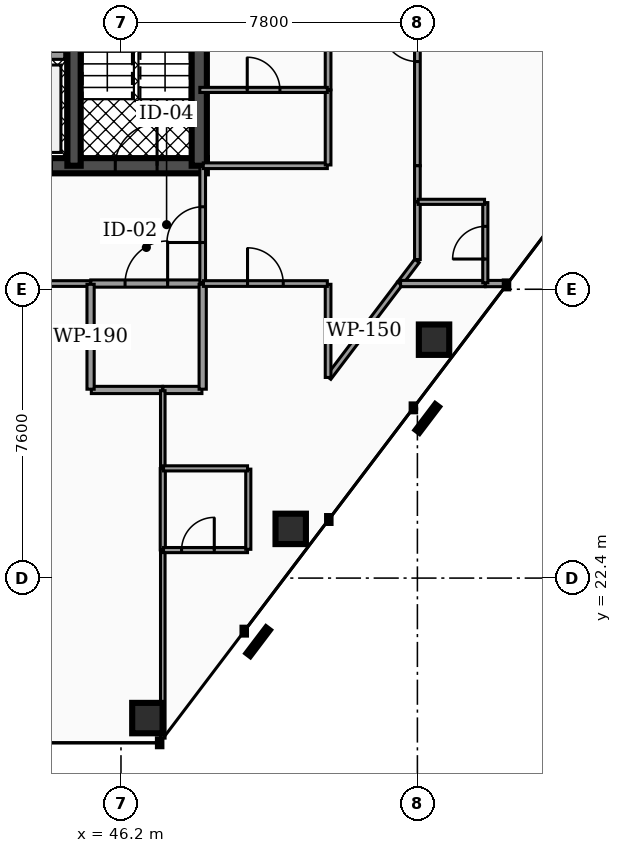
"""IFC4 building model, lengths in metres.
Left out: names, types, materials, properties, quantities, classifications, styles, units other than length and angle.
Written with IfcOpenShell. Run it as: python <this file> out.ifc"""

import sys

from ifc_helpers import new_model, si_unit, direction, frame, frame_2d, origin, origin_2d, place, context, subcontext, project, spatial, rectangle, hollow_rectangle, extrude, element, fill, save


model = new_model("IFC4")
c1 = context("Model", 3, precision=1e-05, world=origin(), true_north=direction((0.0, 1.0)))
c2 = subcontext(c1, "Body", "Model", "MODEL_VIEW")
j1 = project(units=[si_unit("LENGTHUNIT", "METRE"), si_unit("PLANEANGLEUNIT", "RADIAN")], contexts=[c1])
p1 = place(None, origin())
s1 = spatial("IfcSite", under=j1, at=p1, CompositionType="ELEMENT")
p2 = place(p1, origin())
s2 = spatial("IfcBuilding", under=s1, at=p2, CompositionType="ELEMENT")
p3 = place(p2, frame((0.0, 0.0, 130.9)))
s3 = spatial("IfcBuildingStorey", under=s2, at=p3, CompositionType="ELEMENT", Elevation=130.9)
p4 = place(p3, frame((28.4, 33.25, 0.0), z_axis=(0.0, 0.0, 1.0), x_axis=(1.0, 0.0, 0.0)))
e1 = element("IfcWall", 1, at=p4, inside=s3, PredefinedType="SHEAR", context=c2, shape_type="SweptSolid", body=[
    extrude(rectangle(XDim=20.06, YDim=0.4, at=frame_2d((10.03, 0.0))), origin(), (0.0, 0.0, 1.0), 3.5),
])
p5 = place(p4, frame((4.03, 0.0, 0.0)))
e2 = element("IfcOpeningElement", 2, at=p5, cuts=e1, PredefinedType="OPENING", context=c2, shape_type="SweptSolid", body=[
    extrude(rectangle(XDim=1.1, YDim=2.15, at=frame_2d((0.55, 1.075))), frame((0.0, 0.21, 0.0), z_axis=(0.0, -1.0, 0.0), x_axis=(1.0, 0.0, 0.0)), (0.0, 0.0, 1.0), 0.42),
])
p6 = place(p4, frame((14.87, 0.0, 0.0)))
e3 = element("IfcOpeningElement", 3, at=p6, cuts=e1, PredefinedType="OPENING", context=c2, shape_type="SweptSolid", body=[
    extrude(rectangle(XDim=1.1, YDim=2.15, at=frame_2d((0.55, 1.075))), frame((0.0, 0.21, 0.0), z_axis=(0.0, -1.0, 0.0), x_axis=(1.0, 0.0, 0.0)), (0.0, 0.0, 1.0), 0.42),
])
p7 = place(p4, frame((5.95, 0.0, 0.0)))
e4 = element("IfcOpeningElement", 4, at=p7, cuts=e1, PredefinedType="OPENING", context=c2, shape_type="SweptSolid", body=[
    extrude(rectangle(XDim=1.0, YDim=2.1, at=frame_2d((0.5, 1.05))), frame((0.0, 0.21, 0.0), z_axis=(0.0, -1.0, 0.0), x_axis=(1.0, 0.0, 0.0)), (0.0, 0.0, 1.0), 0.42),
])
p8 = place(p4, frame((7.65, 0.0, 0.0)))
e5 = element("IfcOpeningElement", 5, at=p8, cuts=e1, PredefinedType="OPENING", context=c2, shape_type="SweptSolid", body=[
    extrude(rectangle(XDim=1.0, YDim=2.1, at=frame_2d((0.5, 1.05))), frame((0.0, 0.21, 0.0), z_axis=(0.0, -1.0, 0.0), x_axis=(1.0, 0.0, 0.0)), (0.0, 0.0, 1.0), 0.42),
])
p9 = place(p4, frame((1.31, 0.0, 0.0)))
e6 = element("IfcOpeningElement", 6, at=p9, cuts=e1, PredefinedType="OPENING", context=c2, shape_type="SweptSolid", body=[
    extrude(rectangle(XDim=1.1, YDim=2.2, at=frame_2d((0.55, 1.1))), frame((0.0, 0.21, 0.0), z_axis=(0.0, -1.0, 0.0), x_axis=(1.0, 0.0, 0.0)), (0.0, 0.0, 1.0), 0.42),
])
p10 = place(p4, frame((9.44, 0.0, 0.0)))
e7 = element("IfcOpeningElement", 7, at=p10, cuts=e1, PredefinedType="OPENING", context=c2, shape_type="SweptSolid", body=[
    extrude(rectangle(XDim=1.12, YDim=2.05, at=frame_2d((0.56, 1.025))), frame((0.0, 0.21, 0.0), z_axis=(0.0, -1.0, 0.0), x_axis=(1.0, 0.0, 0.0)), (0.0, 0.0, 1.0), 0.42),
])
p11 = place(p4, frame((17.65, 0.0, 0.0)))
e8 = element("IfcOpeningElement", 8, at=p11, cuts=e1, PredefinedType="OPENING", context=c2, shape_type="SweptSolid", body=[
    extrude(rectangle(XDim=1.1, YDim=2.2, at=frame_2d((0.55, 1.1))), frame((0.0, 0.21, 0.0), z_axis=(0.0, -1.0, 0.0), x_axis=(1.0, 0.0, 0.0)), (0.0, 0.0, 1.0), 0.42),
])
p12 = place(p3, frame((44.965, 33.25, 0.0), z_axis=(0.0, 0.0, 1.0), x_axis=(0.0, 1.0, 0.0)))
e9 = element("IfcWall", 9, at=p12, inside=s3, PredefinedType="SHEAR", context=c2, shape_type="SweptSolid", body=[
    extrude(rectangle(XDim=10.2, YDim=0.35, at=frame_2d((5.1, 0.0))), origin(), (0.0, 0.0, 1.0), 3.5),
])
p13 = place(p3, frame((48.26, 33.25, 0.0), z_axis=(0.0, 0.0, 1.0), x_axis=(0.0, 1.0, 0.0)))
e10 = element("IfcWall", 10, at=p13, inside=s3, PredefinedType="SHEAR", context=c2, shape_type="SweptSolid", body=[
    extrude(rectangle(XDim=10.2, YDim=0.4, at=frame_2d((5.1, 0.0))), origin(), (0.0, 0.0, 1.0), 3.5),
])
p14 = place(p3, frame((46.895, 18.716, 0.0), z_axis=(-0.091289918014, -0.034294463497, 0.995233661329), x_axis=(0.351669482779, -0.936124230475, 0.0)))
e11 = element("IfcColumn", 11, at=p14, inside=s3, PredefinedType="COLUMN", context=c2, shape_type="SweptSolid", body=[
    extrude(hollow_rectangle(XDim=0.8, YDim=0.8, WallThickness=0.04, at=origin_2d()), origin(), (0.0, 0.0, 1.0), 3.517),
])
p15 = place(p3, frame((50.666, 23.695, 0.0), z_axis=(-0.063903576547, 0.002088352175, 0.997953892567), x_axis=(-0.032662302113, -0.99946644467, 0.0)))
e12 = element("IfcColumn", 12, at=p15, inside=s3, PredefinedType="COLUMN", context=c2, shape_type="SweptSolid", body=[
    extrude(hollow_rectangle(XDim=0.8, YDim=0.8, WallThickness=0.04, at=origin_2d()), origin(), (0.0, 0.0, 1.0), 3.507),
])
p16 = place(p3, frame((54.438, 28.673, 0.0), z_axis=(-0.036360710558, 0.038520063101, 0.998596066218), x_axis=(-0.727195467978, -0.686430441744, 0.0)))
e13 = element("IfcColumn", 13, at=p16, inside=s3, PredefinedType="COLUMN", context=c2, shape_type="SweptSolid", body=[
    extrude(hollow_rectangle(XDim=0.8, YDim=0.8, WallThickness=0.04, at=origin_2d()), origin(), (0.0, 0.0, 1.0), 3.505),
])
p17 = place(p3, frame((42.92, 36.155, 0.0), z_axis=(0.0, 0.0, 1.0), x_axis=(1.0, 0.0, 0.0)))
e14 = element("IfcWall", 14, at=p17, inside=s3, PredefinedType="SOLIDWALL", context=c2, shape_type="SweptSolid", body=[
    extrude(rectangle(XDim=1.8, YDim=0.21, at=frame_2d((0.9, 0.0))), origin(), (0.0, 0.0, 1.0), 2.472),
])
p18 = place(p3, frame((45.405, 30.15, 0.0), z_axis=(0.0, 0.0, 1.0), x_axis=(1.0, 0.0, 0.0)))
e15 = element("IfcWall", 15, at=p18, inside=s3, PredefinedType="PARTITIONING", context=c2, shape_type="SweptSolid", body=[
    extrude(rectangle(XDim=2.925, YDim=0.19, at=frame_2d((1.462, 0.0))), origin(), (0.0, 0.0, 1.0), 2.457),
])
p19 = place(p18, frame((0.903, 0.0, 0.0)))
e16 = element("IfcOpeningElement", 16, at=p19, cuts=e15, PredefinedType="OPENING", context=c2, shape_type="SweptSolid", body=[
    extrude(rectangle(XDim=1.12, YDim=2.05, at=frame_2d((0.56, 1.025))), frame((0.0, 0.105, 0.0), z_axis=(0.0, -1.0, 0.0), x_axis=(1.0, 0.0, 0.0)), (0.0, 0.0, 1.0), 0.21),
])
p20 = place(p3, frame((48.35, 30.17, 0.0), z_axis=(0.0, 0.0, 1.0), x_axis=(0.0, 1.0, 0.0)))
e17 = element("IfcWall", 17, at=p20, inside=s3, PredefinedType="PARTITIONING", context=c2, shape_type="SweptSolid", body=[
    extrude(rectangle(XDim=3.06, YDim=0.15, at=frame_2d((1.53, 0.0))), origin(), (0.0, 0.0, 1.0), 2.457),
])
p21 = place(p20, frame((1.06, 0.0, 0.0)))
e18 = element("IfcOpeningElement", 18, at=p21, cuts=e17, PredefinedType="OPENING", context=c2, shape_type="SweptSolid", body=[
    extrude(rectangle(XDim=0.94, YDim=2.05, at=frame_2d((0.47, 1.025))), frame((0.0, 0.085, 0.0), z_axis=(0.0, -1.0, 0.0), x_axis=(1.0, 0.0, 0.0)), (0.0, 0.0, 1.0), 0.17),
])
p22 = place(p3, frame((35.385, 30.15, 0.0), z_axis=(0.0, 0.0, 1.0), x_axis=(1.0, 0.0, 0.0)))
e19 = element("IfcWall", 19, at=p22, inside=s3, PredefinedType="PARTITIONING", context=c2, shape_type="SweptSolid", body=[
    extrude(rectangle(XDim=10.01, YDim=0.15, at=frame_2d((5.005, 0.0))), origin(), (0.0, 0.0, 1.0), 2.457),
])
p23 = place(p22, frame((7.935, 0.0, 0.0)))
e20 = element("IfcOpeningElement", 20, at=p23, cuts=e19, PredefinedType="OPENING", context=c2, shape_type="SweptSolid", body=[
    extrude(rectangle(XDim=0.94, YDim=2.05, at=frame_2d((0.47, 1.025))), frame((0.0, 0.085, 0.0), z_axis=(0.0, -1.0, 0.0), x_axis=(1.0, 0.0, 0.0)), (0.0, 0.0, 1.0), 0.17),
])
p24 = place(p3, frame((45.42, 27.35, 0.0), z_axis=(0.0, 0.0, 1.0), x_axis=(1.0, 0.0, 0.0)))
e21 = element("IfcWall", 21, at=p24, inside=s3, PredefinedType="PARTITIONING", context=c2, shape_type="SweptSolid", body=[
    extrude(rectangle(XDim=1.875, YDim=0.19, at=frame_2d((0.938, 0.0))), origin(), (0.0, 0.0, 1.0), 2.457),
])
p25 = place(p3, frame((45.4, 27.37, 0.0), z_axis=(0.0, 0.0, 1.0), x_axis=(0.0, 1.0, 0.0)))
e22 = element("IfcWall", 22, at=p25, inside=s3, PredefinedType="PARTITIONING", context=c2, shape_type="SweptSolid", body=[
    extrude(rectangle(XDim=2.76, YDim=0.19, at=frame_2d((1.38, 0.0))), origin(), (0.0, 0.0, 1.0), 2.457),
])
p26 = place(p3, frame((47.305, 27.35, 0.0), z_axis=(0.0, 0.0, 1.0), x_axis=(1.0, 0.0, 0.0)))
e23 = element("IfcWall", 23, at=p26, inside=s3, PredefinedType="PARTITIONING", context=c2, shape_type="SweptSolid", body=[
    extrude(rectangle(XDim=1.025, YDim=0.19, at=frame_2d((0.513, 0.0))), origin(), (0.0, 0.0, 1.0), 2.457),
])
p27 = place(p3, frame((48.35, 27.37, 0.0), z_axis=(0.0, 0.0, 1.0), x_axis=(0.0, 1.0, 0.0)))
e24 = element("IfcWall", 24, at=p27, inside=s3, PredefinedType="PARTITIONING", context=c2, shape_type="SweptSolid", body=[
    extrude(rectangle(XDim=2.76, YDim=0.19, at=frame_2d((1.38, 0.0))), origin(), (0.0, 0.0, 1.0), 2.457),
])
p28 = place(p3, frame((51.662, 27.675, 0.0), z_axis=(0.0, 0.0, 1.0), x_axis=(0.603831940294, 0.797111653334, 0.0)))
e25 = element("IfcWall", 25, at=p28, inside=s3, PredefinedType="PARTITIONING", context=c2, shape_type="SweptSolid", body=[
    extrude(rectangle(XDim=3.104, YDim=0.15, at=frame_2d((1.552, 0.0))), origin(), (0.0, 0.0, 1.0), 2.457),
])
p29 = place(p3, frame((51.65, 27.679, 0.0), z_axis=(0.0, 0.0, 1.0), x_axis=(0.0, 1.0, 0.0)))
e26 = element("IfcWall", 26, at=p29, inside=s3, PredefinedType="PARTITIONING", context=c2, shape_type="SweptSolid", body=[
    extrude(rectangle(XDim=2.451, YDim=0.15, at=frame_2d((1.225, 0.0))), origin(), (0.0, 0.0, 1.0), 2.457),
])
p30 = place(p3, frame((48.37, 30.15, 0.0), z_axis=(0.0, 0.0, 1.0), x_axis=(1.0, 0.0, 0.0)))
e27 = element("IfcWall", 27, at=p30, inside=s3, PredefinedType="PARTITIONING", context=c2, shape_type="SweptSolid", body=[
    extrude(rectangle(XDim=3.26, YDim=0.15, at=frame_2d((1.63, 0.0))), origin(), (0.0, 0.0, 1.0), 2.457),
])
p31 = place(p30, frame((1.16, 0.0, 0.0)))
e28 = element("IfcOpeningElement", 28, at=p31, cuts=e27, PredefinedType="OPENING", context=c2, shape_type="SweptSolid", body=[
    extrude(rectangle(XDim=0.94, YDim=2.05, at=frame_2d((0.47, 1.025))), frame((0.0, 0.085, 0.0), z_axis=(0.0, -1.0, 0.0), x_axis=(1.0, 0.0, 0.0)), (0.0, 0.0, 1.0), 0.17),
])
p32 = place(p3, frame((54.0, 33.25, 0.0), z_axis=(0.0, 0.0, 1.0), x_axis=(0.0, 1.0, 0.0)))
e29 = element("IfcWall", 29, at=p32, inside=s3, PredefinedType="PARTITIONING", context=c2, shape_type="SweptSolid", body=[
    extrude(rectangle(XDim=6.423, YDim=0.15, at=frame_2d((3.212, 0.0))), origin(), (0.0, 0.0, 1.0), 2.457),
])
p33 = place(p32, frame((2.742, 0.0, 0.0)))
e30 = element("IfcOpeningElement", 30, at=p33, cuts=e29, PredefinedType="OPENING", context=c2, shape_type="SweptSolid", body=[
    extrude(rectangle(XDim=0.94, YDim=2.05, at=frame_2d((0.47, 1.025))), frame((0.0, 0.085, 0.0), z_axis=(0.0, -1.0, 0.0), x_axis=(1.0, 0.0, 0.0)), (0.0, 0.0, 1.0), 0.17),
])
p34 = place(p3, frame((54.0, 32.305, 0.0), z_axis=(0.0, 0.0, 1.0), x_axis=(0.0, 1.0, 0.0)))
e31 = element("IfcWall", 31, at=p34, inside=s3, PredefinedType="PARTITIONING", context=c2, shape_type="SweptSolid", body=[
    extrude(rectangle(XDim=0.945, YDim=0.15, at=frame_2d((0.473, 0.0))), origin(), (0.0, 0.0, 1.0), 2.457),
])
p35 = place(p3, frame((54.0, 30.781, 0.0), z_axis=(0.0, 0.0, 1.0), x_axis=(0.0, 1.0, 0.0)))
e32 = element("IfcWall", 32, at=p35, inside=s3, PredefinedType="PARTITIONING", context=c2, shape_type="SweptSolid", body=[
    extrude(rectangle(XDim=1.514, YDim=0.15, at=frame_2d((0.757, 0.0))), origin(), (0.0, 0.0, 1.0), 2.457),
])
p36 = place(p3, frame((53.54, 30.154, 0.0), z_axis=(0.0, 0.0, 1.0), x_axis=(0.603680225987, 0.797226557982, 0.0)))
e33 = element("IfcWall", 33, at=p36, inside=s3, PredefinedType="PARTITIONING", context=c2, shape_type="SweptSolid", body=[
    extrude(rectangle(XDim=0.742, YDim=0.15, at=frame_2d((0.371, 0.0))), origin(), (0.0, 0.0, 1.0), 2.457),
])
p37 = place(p3, frame((51.65, 35.25, 0.0), z_axis=(0.0, 0.0, 1.0), x_axis=(0.0, 1.0, 0.0)))
e34 = element("IfcWall", 34, at=p37, inside=s3, PredefinedType="PARTITIONING", context=c2, shape_type="SweptSolid", body=[
    extrude(rectangle(XDim=5.994, YDim=0.15, at=frame_2d((2.997, 0.0))), origin(), (0.0, 0.0, 1.0), 2.457),
])
p38 = place(p37, frame((2.527, 0.0, 0.0)))
e35 = element("IfcOpeningElement", 35, at=p38, cuts=e34, PredefinedType="OPENING", context=c2, shape_type="SweptSolid", body=[
    extrude(rectangle(XDim=0.94, YDim=2.05, at=frame_2d((0.47, 1.025))), frame((0.0, 0.085, 0.0), z_axis=(0.0, -1.0, 0.0), x_axis=(1.0, 0.0, 0.0)), (0.0, 0.0, 1.0), 0.17),
])
p39 = place(p3, frame((48.365, 33.25, 0.0), z_axis=(0.0, 0.0, 1.0), x_axis=(1.0, 0.0, 0.0)))
e36 = element("IfcWall", 36, at=p39, inside=s3, PredefinedType="PARTITIONING", context=c2, shape_type="SweptSolid", body=[
    extrude(rectangle(XDim=3.265, YDim=0.15, at=frame_2d((1.632, 0.0))), origin(), (0.0, 0.0, 1.0), 2.457),
])
p40 = place(p3, frame((51.65, 33.27, 0.0), z_axis=(0.0, 0.0, 1.0), x_axis=(0.0, 1.0, 0.0)))
e37 = element("IfcWall", 37, at=p40, inside=s3, PredefinedType="PARTITIONING", context=c2, shape_type="SweptSolid", body=[
    extrude(rectangle(XDim=1.969, YDim=0.15, at=frame_2d((0.985, 0.0))), origin(), (0.0, 0.0, 1.0), 2.457),
])
p41 = place(p3, frame((47.3, 25.292, 0.0), z_axis=(0.0, 0.0, 1.0), x_axis=(0.0, 1.0, 0.0)))
e38 = element("IfcWall", 38, at=p41, inside=s3, PredefinedType="PARTITIONING", context=c2, shape_type="SweptSolid", body=[
    extrude(rectangle(XDim=2.038, YDim=0.12, at=frame_2d((1.019, 0.0))), origin(), (0.0, 0.0, 1.0), 2.457),
])
p42 = place(p3, frame((47.3, 18.19, 0.0), z_axis=(0.0, 0.0, 1.0), x_axis=(0.0, 1.0, 0.0)))
e39 = element("IfcWall", 39, at=p42, inside=s3, PredefinedType="PARTITIONING", context=c2, shape_type="SweptSolid", body=[
    extrude(rectangle(XDim=4.942, YDim=0.12, at=frame_2d((2.471, 0.0))), origin(), (0.0, 0.0, 1.0), 2.457),
])
p43 = place(p3, frame((47.3, 23.142, 0.0), z_axis=(0.0, 0.0, 1.0), x_axis=(0.0, 1.0, 0.0)))
e40 = element("IfcWall", 40, at=p43, inside=s3, PredefinedType="PARTITIONING", context=c2, shape_type="SweptSolid", body=[
    extrude(rectangle(XDim=2.14, YDim=0.135, at=frame_2d((1.07, 0.0))), origin(), (0.0, 0.0, 1.0), 2.457),
])
p44 = place(p3, frame((47.32, 23.137, 0.0), z_axis=(0.0, 0.0, 1.0), x_axis=(1.0, 0.0, 0.0)))
e41 = element("IfcWall", 41, at=p44, inside=s3, PredefinedType="PARTITIONING", context=c2, shape_type="SweptSolid", body=[
    extrude(rectangle(XDim=2.21, YDim=0.135, at=frame_2d((1.105, 0.0))), origin(), (0.0, 0.0, 1.0), 2.457),
])
p45 = place(p44, frame((0.475, 0.0, 0.0)))
e42 = element("IfcOpeningElement", 42, at=p45, cuts=e41, PredefinedType="OPENING", context=c2, shape_type="SweptSolid", body=[
    extrude(rectangle(XDim=0.86, YDim=2.05, at=frame_2d((0.43, 1.025))), frame((0.0, 0.077, 0.0), z_axis=(0.0, -1.0, 0.0), x_axis=(1.0, 0.0, 0.0)), (0.0, 0.0, 1.0), 0.155),
])
p46 = place(p3, frame((49.55, 23.157, 0.0), z_axis=(0.0, 0.0, 1.0), x_axis=(0.0, 1.0, 0.0)))
e43 = element("IfcWall", 43, at=p46, inside=s3, PredefinedType="PARTITIONING", context=c2, shape_type="SweptSolid", body=[
    extrude(rectangle(XDim=2.11, YDim=0.135, at=frame_2d((1.055, 0.0))), origin(), (0.0, 0.0, 1.0), 2.457),
])
p47 = place(p3, frame((47.32, 25.287, 0.0), z_axis=(0.0, 0.0, 1.0), x_axis=(1.0, 0.0, 0.0)))
e44 = element("IfcWall", 44, at=p47, inside=s3, PredefinedType="PARTITIONING", context=c2, shape_type="SweptSolid", body=[
    extrude(rectangle(XDim=2.21, YDim=0.135, at=frame_2d((1.105, 0.0))), origin(), (0.0, 0.0, 1.0), 2.457),
])
p48 = place(p3, frame((55.792, 30.15, 0.0), z_axis=(0.0, 0.0, 1.0), x_axis=(1.0, 0.0, 0.0)))
e45 = element("IfcWall", 45, at=p48, inside=s3, PredefinedType="PARTITIONING", context=c2, shape_type="SweptSolid", body=[
    extrude(rectangle(XDim=0.565, YDim=0.165, at=frame_2d((0.283, 0.0))), origin(), (0.0, 0.0, 1.0), 2.457),
])
p49 = place(p3, frame((53.557, 30.15, 0.0), z_axis=(0.0, 0.0, 1.0), x_axis=(1.0, 0.0, 0.0)))
e46 = element("IfcWall", 46, at=p49, inside=s3, PredefinedType="PARTITIONING", context=c2, shape_type="SweptSolid", body=[
    extrude(rectangle(XDim=2.225, YDim=0.165, at=frame_2d((1.113, 0.0))), origin(), (0.0, 0.0, 1.0), 2.457),
])
p50 = place(p3, frame((55.787, 30.17, 0.0), z_axis=(0.0, 0.0, 1.0), x_axis=(0.0, 1.0, 0.0)))
e47 = element("IfcWall", 47, at=p50, inside=s3, PredefinedType="PARTITIONING", context=c2, shape_type="SweptSolid", body=[
    extrude(rectangle(XDim=2.11, YDim=0.135, at=frame_2d((1.055, 0.0))), origin(), (0.0, 0.0, 1.0), 2.457),
])
p51 = place(p50, frame((0.625, 0.0, 0.0)))
e48 = element("IfcOpeningElement", 48, at=p51, cuts=e47, PredefinedType="OPENING", context=c2, shape_type="SweptSolid", body=[
    extrude(rectangle(XDim=0.86, YDim=2.05, at=frame_2d((0.43, 1.025))), frame((0.0, 0.077, 0.0), z_axis=(0.0, -1.0, 0.0), x_axis=(1.0, 0.0, 0.0)), (0.0, 0.0, 1.0), 0.155),
])
p52 = place(p3, frame((54.02, 32.3, 0.0), z_axis=(0.0, 0.0, 1.0), x_axis=(1.0, 0.0, 0.0)))
e49 = element("IfcWall", 49, at=p52, inside=s3, PredefinedType="PARTITIONING", context=c2, shape_type="SweptSolid", body=[
    extrude(rectangle(XDim=1.747, YDim=0.135, at=frame_2d((0.874, 0.0))), origin(), (0.0, 0.0, 1.0), 2.457),
])
p53 = place(p3, frame((48.275, 35.245, 0.0), z_axis=(0.0, 0.0, 1.0), x_axis=(1.0, 0.0, 0.0)))
e50 = element("IfcWall", 50, at=p53, inside=s3, PredefinedType="PARTITIONING", context=c2, shape_type="SweptSolid", body=[
    extrude(rectangle(XDim=3.355, YDim=0.135, at=frame_2d((1.677, 0.0))), origin(), (0.0, 0.0, 1.0), 2.457),
])
p54 = place(p53, frame((1.248, 0.0, 0.0)))
e51 = element("IfcOpeningElement", 51, at=p54, cuts=e50, PredefinedType="OPENING", context=c2, shape_type="SweptSolid", body=[
    extrude(rectangle(XDim=0.86, YDim=2.05, at=frame_2d((0.43, 1.025))), frame((0.0, 0.077, 0.0), z_axis=(0.0, -1.0, 0.0), x_axis=(1.0, 0.0, 0.0)), (0.0, 0.0, 1.0), 0.155),
])
p55 = place(p11, origin())
e52 = element("IfcDoor", 52, at=p55, inside=s3, OperationType="SINGLE_SWING_RIGHT", PredefinedType="DOOR", context=c2, shape_type="SweptSolid", body=[
    extrude(rectangle(XDim=1.1, YDim=2.2, at=frame_2d((0.55, 1.1))), frame((0.0, 0.025, 0.0), z_axis=(0.0, -1.0, 0.0), x_axis=(1.0, 0.0, 0.0)), (0.0, 0.0, 1.0), 0.05),
])
fill(e8, e52)
p56 = place(p19, origin())
e53 = element("IfcDoor", 53, at=p56, inside=s3, OperationType="SINGLE_SWING_RIGHT", PredefinedType="DOOR", context=c2, shape_type="SweptSolid", body=[
    extrude(rectangle(XDim=1.12, YDim=2.05, at=frame_2d((0.56, 1.025))), frame((0.0, 0.025, 0.0), z_axis=(0.0, -1.0, 0.0), x_axis=(1.0, 0.0, 0.0)), (0.0, 0.0, 1.0), 0.05),
])
fill(e16, e53)
p57 = place(p21, origin())
e54 = element("IfcDoor", 54, at=p57, inside=s3, OperationType="SINGLE_SWING_LEFT", PredefinedType="DOOR", context=c2, shape_type="SweptSolid", body=[
    extrude(rectangle(XDim=0.94, YDim=2.05, at=frame_2d((0.47, 1.025))), frame((0.0, 0.025, 0.0), z_axis=(0.0, -1.0, 0.0), x_axis=(1.0, 0.0, 0.0)), (0.0, 0.0, 1.0), 0.05),
])
fill(e18, e54)
p58 = place(p31, origin())
e55 = element("IfcDoor", 55, at=p58, inside=s3, OperationType="SINGLE_SWING_LEFT", PredefinedType="DOOR", context=c2, shape_type="SweptSolid", body=[
    extrude(rectangle(XDim=0.94, YDim=2.05, at=frame_2d((0.47, 1.025))), frame((0.0, 0.025, 0.0), z_axis=(0.0, -1.0, 0.0), x_axis=(1.0, 0.0, 0.0)), (0.0, 0.0, 1.0), 0.05),
])
fill(e28, e55)
p59 = place(p33, origin())
e56 = element("IfcDoor", 56, at=p59, inside=s3, OperationType="SINGLE_SWING_RIGHT", PredefinedType="DOOR", context=c2, shape_type="SweptSolid", body=[
    extrude(rectangle(XDim=0.94, YDim=2.05, at=frame_2d((0.47, 1.025))), frame((0.0, 0.025, 0.0), z_axis=(0.0, -1.0, 0.0), x_axis=(1.0, 0.0, 0.0)), (0.0, 0.0, 1.0), 0.05),
])
fill(e30, e56)
p60 = place(p45, origin())
e57 = element("IfcDoor", 57, at=p60, inside=s3, OperationType="SINGLE_SWING_RIGHT", PredefinedType="DOOR", context=c2, shape_type="SweptSolid", body=[
    extrude(rectangle(XDim=0.86, YDim=2.05, at=frame_2d((0.43, 1.025))), frame((0.0, 0.025, 0.0), z_axis=(0.0, -1.0, 0.0), x_axis=(1.0, 0.0, 0.0)), (0.0, 0.0, 1.0), 0.05),
])
fill(e42, e57)
p61 = place(p51, origin())
e58 = element("IfcDoor", 58, at=p61, inside=s3, OperationType="SINGLE_SWING_LEFT", PredefinedType="DOOR", context=c2, shape_type="SweptSolid", body=[
    extrude(rectangle(XDim=0.86, YDim=2.05, at=frame_2d((0.43, 1.025))), frame((0.0, 0.025, 0.0), z_axis=(0.0, -1.0, 0.0), x_axis=(1.0, 0.0, 0.0)), (0.0, 0.0, 1.0), 0.05),
])
fill(e48, e58)
p62 = place(p54, origin())
e59 = element("IfcDoor", 59, at=p62, inside=s3, OperationType="SINGLE_SWING_LEFT", PredefinedType="DOOR", context=c2, shape_type="SweptSolid", body=[
    extrude(rectangle(XDim=0.86, YDim=2.05, at=frame_2d((0.43, 1.025))), frame((0.0, 0.025, 0.0), z_axis=(0.0, -1.0, 0.0), x_axis=(1.0, 0.0, 0.0)), (0.0, 0.0, 1.0), 0.05),
])
fill(e51, e59)
save(model, sys.argv[1])
